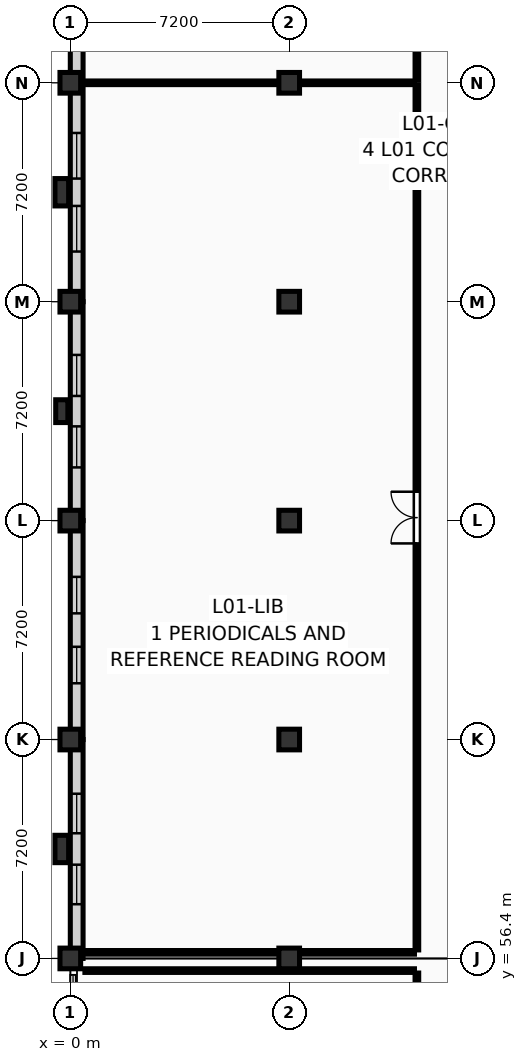
"""IFC4 building model, lengths in metres.
Left out: names, types, materials, properties, quantities, classifications, styles, units other than length and angle.
Written with IfcOpenShell. Run it as: python <this file> out.ifc"""

import sys

from ifc_helpers import new_model, si_unit, direction, frame, frame_2d, origin, origin_2d, place, context, subcontext, project, spatial, rectangle, extrude, element, fill, save


model = new_model("IFC4")
c1 = context("Model", 3, precision=1e-05, world=origin(), true_north=direction((0.0, 1.0)))
c2 = subcontext(c1, "Body", "Model", "MODEL_VIEW")
j1 = project(units=[si_unit("LENGTHUNIT", "METRE"), si_unit("PLANEANGLEUNIT", "RADIAN")], contexts=[c1])
p1 = place(None, origin())
s1 = spatial("IfcSite", under=j1, at=p1, CompositionType="ELEMENT")
p2 = place(p1, origin())
s2 = spatial("IfcBuilding", under=s1, at=p2, CompositionType="ELEMENT")
p3 = place(p2, frame((0.0, 0.0, 4.5)))
s3 = spatial("IfcBuildingStorey", under=s2, at=p3, CompositionType="ELEMENT", Elevation=4.5)
for number, where, z_axis, x_axis in (
    (1, (0.0, 56.4, 0.0), (0.0, 0.0, 1.0), (1.0, 0.0, 0.0)),
    (2, (0.0, 63.6, 0.0), (0.0, 0.0, 1.0), (1.0, 0.0, 0.0)),
    (3, (0.0, 70.8, 0.0), (0.0, 0.0, 1.0), (1.0, 0.0, 0.0)),
    (4, (0.0, 78.0, 0.0), (0.0, 0.0, 1.0), (1.0, 0.0, 0.0)),
    (5, (0.0, 85.2, 0.0), (0.0, 0.0, 1.0), (1.0, 0.0, 0.0)),
    (6, (7.2, 56.4, 0.0), (0.0, 0.0, 1.0), (1.0, 0.0, 0.0)),
    (7, (7.2, 63.6, 0.0), (0.0, 0.0, 1.0), (1.0, 0.0, 0.0)),
    (8, (7.2, 70.8, 0.0), (0.0, 0.0, 1.0), (1.0, 0.0, 0.0)),
    (9, (7.2, 78.0, 0.0), (0.0, 0.0, 1.0), (1.0, 0.0, 0.0)),
    (10, (7.2, 85.2, 0.0), (0.0, 0.0, 1.0), (1.0, 0.0, 0.0)),
):
    element("IfcColumn", number, at=place(p3, frame(where, z_axis=z_axis, x_axis=x_axis)), inside=s3, PredefinedType="COLUMN", context=c2, shape_type="SweptSolid", body=[
        extrude(rectangle(XDim=0.68, YDim=0.68, at=origin_2d()), origin(), (0.0, 0.0, 1.0), 4.05),
    ])
p4 = place(p3, frame((-0.28, 60.0, 0.0), z_axis=(0.0, 0.0, 1.0), x_axis=(1.0, 0.0, 0.0)))
e11 = element("IfcColumn", 11, at=p4, inside=s3, PredefinedType="PILASTER", context=c2, shape_type="SweptSolid", body=[
    extrude(rectangle(XDim=0.45, YDim=0.9, at=origin_2d()), origin(), (0.0, 0.0, 1.0), 4.05),
])
p5 = place(p3, frame((-0.28, 74.4, 0.0), z_axis=(0.0, 0.0, 1.0), x_axis=(1.0, 0.0, 0.0)))
e12 = element("IfcColumn", 12, at=p5, inside=s3, PredefinedType="PILASTER", context=c2, shape_type="SweptSolid", body=[
    extrude(rectangle(XDim=0.4, YDim=0.75, at=origin_2d()), origin(), (0.0, 0.0, 1.0), 4.05),
])
p6 = place(p3, frame((-0.28, 81.6, 0.0), z_axis=(0.0, 0.0, 1.0), x_axis=(1.0, 0.0, 0.0)))
e13 = element("IfcColumn", 13, at=p6, inside=s3, PredefinedType="PILASTER", context=c2, shape_type="SweptSolid", body=[
    extrude(rectangle(XDim=0.45, YDim=0.9, at=origin_2d()), origin(), (0.0, 0.0, 1.0), 4.05),
])
p7 = place(p3, frame((0.21, 56.4, 0.0), z_axis=(0.0, 0.0, 1.0), x_axis=(0.0, 1.0, 0.0)))
e14 = element("IfcWall", 14, at=p7, inside=s3, PredefinedType="SOLIDWALL", context=c2, shape_type="SweptSolid", body=[
    extrude(rectangle(XDim=7.2, YDim=0.42, at=frame_2d((3.6, 0.0))), origin(), (0.0, 0.0, 1.0), 3.16),
])
p8 = place(p7, frame((1.783, 0.0, 0.45)))
e15 = element("IfcOpeningElement", 15, at=p8, cuts=e14, PredefinedType="OPENING", context=c2, shape_type="SweptSolid", body=[
    extrude(rectangle(XDim=1.3, YDim=2.35, at=frame_2d((0.65, 1.175))), frame((0.0, 0.222, 0.0), z_axis=(0.0, -1.0, 0.0), x_axis=(1.0, 0.0, 0.0)), (0.0, 0.0, 1.0), 0.444),
])
p9 = place(p7, frame((4.117, 0.0, 0.45)))
e16 = element("IfcOpeningElement", 16, at=p9, cuts=e14, PredefinedType="OPENING", context=c2, shape_type="SweptSolid", body=[
    extrude(rectangle(XDim=1.3, YDim=2.35, at=frame_2d((0.65, 1.175))), frame((0.0, 0.222, 0.0), z_axis=(0.0, -1.0, 0.0), x_axis=(1.0, 0.0, 0.0)), (0.0, 0.0, 1.0), 0.444),
])
p10 = place(p3, frame((0.21, 63.6, 0.0), z_axis=(0.0, 0.0, 1.0), x_axis=(0.0, 1.0, 0.0)))
e17 = element("IfcWall", 17, at=p10, inside=s3, PredefinedType="SOLIDWALL", context=c2, shape_type="SweptSolid", body=[
    extrude(rectangle(XDim=7.2, YDim=0.42, at=frame_2d((3.6, 0.0))), origin(), (0.0, 0.0, 1.0), 3.16),
])
p11 = place(p10, frame((1.85, 0.0, 0.45)))
e18 = element("IfcOpeningElement", 18, at=p11, cuts=e17, PredefinedType="OPENING", context=c2, shape_type="SweptSolid", body=[
    extrude(rectangle(XDim=1.2, YDim=2.35, at=frame_2d((0.6, 1.175))), frame((0.0, 0.222, 0.0), z_axis=(0.0, -1.0, 0.0), x_axis=(1.0, 0.0, 0.0)), (0.0, 0.0, 1.0), 0.444),
])
p12 = place(p10, frame((4.15, 0.0, 0.45)))
e19 = element("IfcOpeningElement", 19, at=p12, cuts=e17, PredefinedType="OPENING", context=c2, shape_type="SweptSolid", body=[
    extrude(rectangle(XDim=1.2, YDim=2.35, at=frame_2d((0.6, 1.175))), frame((0.0, 0.222, 0.0), z_axis=(0.0, -1.0, 0.0), x_axis=(1.0, 0.0, 0.0)), (0.0, 0.0, 1.0), 0.444),
])
p13 = place(p3, frame((0.21, 70.8, 0.0), z_axis=(0.0, 0.0, 1.0), x_axis=(0.0, 1.0, 0.0)))
e20 = element("IfcWall", 20, at=p13, inside=s3, PredefinedType="SOLIDWALL", context=c2, shape_type="SweptSolid", body=[
    extrude(rectangle(XDim=7.2, YDim=0.42, at=frame_2d((3.6, 0.0))), origin(), (0.0, 0.0, 1.0), 3.16),
])
p14 = place(p13, frame((1.75, 0.0, 0.45)))
e21 = element("IfcOpeningElement", 21, at=p14, cuts=e20, PredefinedType="OPENING", context=c2, shape_type="SweptSolid", body=[
    extrude(rectangle(XDim=1.35, YDim=2.45, at=frame_2d((0.675, 1.225))), frame((0.0, 0.222, 0.0), z_axis=(0.0, -1.0, 0.0), x_axis=(1.0, 0.0, 0.0)), (0.0, 0.0, 1.0), 0.444),
])
p15 = place(p13, frame((4.1, 0.0, 0.45)))
e22 = element("IfcOpeningElement", 22, at=p15, cuts=e20, PredefinedType="OPENING", context=c2, shape_type="SweptSolid", body=[
    extrude(rectangle(XDim=1.35, YDim=2.45, at=frame_2d((0.675, 1.225))), frame((0.0, 0.222, 0.0), z_axis=(0.0, -1.0, 0.0), x_axis=(1.0, 0.0, 0.0)), (0.0, 0.0, 1.0), 0.444),
])
p16 = place(p3, frame((0.21, 78.0, 0.0), z_axis=(0.0, 0.0, 1.0), x_axis=(0.0, 1.0, 0.0)))
e23 = element("IfcWall", 23, at=p16, inside=s3, PredefinedType="SOLIDWALL", context=c2, shape_type="SweptSolid", body=[
    extrude(rectangle(XDim=7.2, YDim=0.42, at=frame_2d((3.6, 0.0))), origin(), (0.0, 0.0, 1.0), 3.16),
])
p17 = place(p16, frame((1.65, 0.0, 0.45)))
e24 = element("IfcOpeningElement", 24, at=p17, cuts=e23, PredefinedType="OPENING", context=c2, shape_type="SweptSolid", body=[
    extrude(rectangle(XDim=1.5, YDim=2.4, at=frame_2d((0.75, 1.2))), frame((0.0, 0.222, 0.0), z_axis=(0.0, -1.0, 0.0), x_axis=(1.0, 0.0, 0.0)), (0.0, 0.0, 1.0), 0.444),
])
p18 = place(p16, frame((4.05, 0.0, 0.45)))
e25 = element("IfcOpeningElement", 25, at=p18, cuts=e23, PredefinedType="OPENING", context=c2, shape_type="SweptSolid", body=[
    extrude(rectangle(XDim=1.5, YDim=2.4, at=frame_2d((0.75, 1.2))), frame((0.0, 0.222, 0.0), z_axis=(0.0, -1.0, 0.0), x_axis=(1.0, 0.0, 0.0)), (0.0, 0.0, 1.0), 0.444),
])
p19 = place(p3, frame((0.21, 85.2, 0.0), z_axis=(0.0, 0.0, 1.0), x_axis=(0.0, 1.0, 0.0)))
e26 = element("IfcWall", 26, at=p19, inside=s3, PredefinedType="SOLIDWALL", context=c2, shape_type="SweptSolid", body=[
    extrude(rectangle(XDim=7.2, YDim=0.42, at=frame_2d((3.6, 0.0))), origin(), (0.0, 0.0, 1.0), 3.16),
])
p20 = place(p19, frame((1.717, 0.0, 0.45)))
e27 = element("IfcOpeningElement", 27, at=p20, cuts=e26, PredefinedType="OPENING", context=c2, shape_type="SweptSolid", body=[
    extrude(rectangle(XDim=1.4, YDim=2.38, at=frame_2d((0.7, 1.19))), frame((0.0, 0.222, 0.0), z_axis=(0.0, -1.0, 0.0), x_axis=(1.0, 0.0, 0.0)), (0.0, 0.0, 1.0), 0.444),
])
p21 = place(p19, frame((4.083, 0.0, 0.45)))
e28 = element("IfcOpeningElement", 28, at=p21, cuts=e26, PredefinedType="OPENING", context=c2, shape_type="SweptSolid", body=[
    extrude(rectangle(XDim=1.4, YDim=2.38, at=frame_2d((0.7, 1.19))), frame((0.0, 0.222, 0.0), z_axis=(0.0, -1.0, 0.0), x_axis=(1.0, 0.0, 0.0)), (0.0, 0.0, 1.0), 0.444),
])
p22 = place(p3, frame((11.4, 38.48, 0.0), z_axis=(0.0, 0.0, 1.0), x_axis=(0.0, 1.0, 0.0)))
e29 = element("IfcWall", 29, at=p22, inside=s3, PredefinedType="PARTITIONING", context=c2, shape_type="SweptSolid", body=[
    extrude(rectangle(XDim=17.44, YDim=0.12, at=frame_2d((8.72, 0.0))), origin(), (0.0, 0.0, 1.0), 3.775),
])
p23 = place(p22, frame((8.06, 0.0, 0.0)))
e30 = element("IfcOpeningElement", 30, at=p23, cuts=e29, PredefinedType="OPENING", context=c2, shape_type="SweptSolid", body=[
    extrude(rectangle(XDim=1.32, YDim=2.2, at=frame_2d((0.66, 1.1))), frame((0.0, 0.072, 0.0), z_axis=(0.0, -1.0, 0.0), x_axis=(1.0, 0.0, 0.0)), (0.0, 0.0, 1.0), 0.144),
])
for number, where, z_axis, x_axis in (
    (31, (0.48, 56.0, 0.0), (0.0, 0.0, 1.0), (1.0, 0.0, 0.0)),
    (32, (0.48, 56.6, 0.0), (0.0, 0.0, 1.0), (1.0, 0.0, 0.0)),
):
    element("IfcWall", number, at=place(p3, frame(where, z_axis=z_axis, x_axis=x_axis)), inside=s3, PredefinedType="PARTITIONING", context=c2, shape_type="SweptSolid", body=[
        extrude(rectangle(XDim=10.84, YDim=0.12, at=frame_2d((5.42, 0.0))), origin(), (0.0, 0.0, 1.0), 3.025),
    ])
p24 = place(p3, frame((11.4, 56.68, 0.0), z_axis=(0.0, 0.0, 1.0), x_axis=(0.0, 1.0, 0.0)))
e33 = element("IfcWall", 33, at=p24, inside=s3, PredefinedType="PARTITIONING", context=c2, shape_type="SweptSolid", body=[
    extrude(rectangle(XDim=28.44, YDim=0.12, at=frame_2d((14.22, 0.0))), origin(), (0.0, 0.0, 1.0), 3.775),
])
p25 = place(p24, frame((13.37, 0.0, 0.0)))
e34 = element("IfcOpeningElement", 34, at=p25, cuts=e33, PredefinedType="OPENING", context=c2, shape_type="SweptSolid", body=[
    extrude(rectangle(XDim=1.7, YDim=2.28, at=frame_2d((0.85, 1.14))), frame((0.0, 0.072, 0.0), z_axis=(0.0, -1.0, 0.0), x_axis=(1.0, 0.0, 0.0)), (0.0, 0.0, 1.0), 0.144),
])
p26 = place(p3, frame((0.48, 85.2, 0.0), z_axis=(0.0, 0.0, 1.0), x_axis=(1.0, 0.0, 0.0)))
e35 = element("IfcWall", 35, at=p26, inside=s3, PredefinedType="PARTITIONING", context=c2, shape_type="SweptSolid", body=[
    extrude(rectangle(XDim=10.84, YDim=0.12, at=frame_2d((5.42, 0.0))), origin(), (0.0, 0.0, 1.0), 3.025),
])
p27 = place(p3, frame((11.4, 85.28, 0.0), z_axis=(0.0, 0.0, 1.0), x_axis=(0.0, 1.0, 0.0)))
e36 = element("IfcWall", 36, at=p27, inside=s3, PredefinedType="PARTITIONING", context=c2, shape_type="SweptSolid", body=[
    extrude(rectangle(XDim=25.84, YDim=0.12, at=frame_2d((12.92, 0.0))), origin(), (0.0, 0.0, 1.0), 3.775),
])
p28 = place(p27, frame((11.94, 0.0, 0.0)))
e37 = element("IfcOpeningElement", 37, at=p28, cuts=e36, PredefinedType="OPENING", context=c2, shape_type="SweptSolid", body=[
    extrude(rectangle(XDim=1.7, YDim=2.28, at=frame_2d((0.85, 1.14))), frame((0.0, 0.072, 0.0), z_axis=(0.0, -1.0, 0.0), x_axis=(1.0, 0.0, 0.0)), (0.0, 0.0, 1.0), 0.144),
])
p29 = place(p8, origin())
e38 = element("IfcWindow", 38, at=p29, inside=s3, PartitioningType="SINGLE_PANEL", PredefinedType="WINDOW", context=c2, shape_type="SweptSolid", body=[
    extrude(rectangle(XDim=1.3, YDim=2.35, at=frame_2d((0.65, 1.175))), frame((0.0, 0.03, 0.0), z_axis=(0.0, -1.0, 0.0), x_axis=(1.0, 0.0, 0.0)), (0.0, 0.0, 1.0), 0.06),
])
fill(e15, e38)
p30 = place(p9, origin())
e39 = element("IfcWindow", 39, at=p30, inside=s3, PartitioningType="SINGLE_PANEL", PredefinedType="WINDOW", context=c2, shape_type="SweptSolid", body=[
    extrude(rectangle(XDim=1.3, YDim=2.35, at=frame_2d((0.65, 1.175))), frame((0.0, 0.03, 0.0), z_axis=(0.0, -1.0, 0.0), x_axis=(1.0, 0.0, 0.0)), (0.0, 0.0, 1.0), 0.06),
])
fill(e16, e39)
p31 = place(p11, origin())
e40 = element("IfcWindow", 40, at=p31, inside=s3, PartitioningType="SINGLE_PANEL", PredefinedType="WINDOW", context=c2, shape_type="SweptSolid", body=[
    extrude(rectangle(XDim=1.2, YDim=2.35, at=frame_2d((0.6, 1.175))), frame((0.0, 0.03, 0.0), z_axis=(0.0, -1.0, 0.0), x_axis=(1.0, 0.0, 0.0)), (0.0, 0.0, 1.0), 0.06),
])
fill(e18, e40)
p32 = place(p12, origin())
e41 = element("IfcWindow", 41, at=p32, inside=s3, PartitioningType="SINGLE_PANEL", PredefinedType="WINDOW", context=c2, shape_type="SweptSolid", body=[
    extrude(rectangle(XDim=1.2, YDim=2.35, at=frame_2d((0.6, 1.175))), frame((0.0, 0.03, 0.0), z_axis=(0.0, -1.0, 0.0), x_axis=(1.0, 0.0, 0.0)), (0.0, 0.0, 1.0), 0.06),
])
fill(e19, e41)
p33 = place(p14, origin())
e42 = element("IfcWindow", 42, at=p33, inside=s3, PartitioningType="SINGLE_PANEL", PredefinedType="WINDOW", context=c2, shape_type="SweptSolid", body=[
    extrude(rectangle(XDim=1.35, YDim=2.45, at=frame_2d((0.675, 1.225))), frame((0.0, 0.03, 0.0), z_axis=(0.0, -1.0, 0.0), x_axis=(1.0, 0.0, 0.0)), (0.0, 0.0, 1.0), 0.06),
])
fill(e21, e42)
p34 = place(p15, origin())
e43 = element("IfcWindow", 43, at=p34, inside=s3, PartitioningType="SINGLE_PANEL", PredefinedType="WINDOW", context=c2, shape_type="SweptSolid", body=[
    extrude(rectangle(XDim=1.35, YDim=2.45, at=frame_2d((0.675, 1.225))), frame((0.0, 0.03, 0.0), z_axis=(0.0, -1.0, 0.0), x_axis=(1.0, 0.0, 0.0)), (0.0, 0.0, 1.0), 0.06),
])
fill(e22, e43)
p35 = place(p17, origin())
e44 = element("IfcWindow", 44, at=p35, inside=s3, PartitioningType="SINGLE_PANEL", PredefinedType="WINDOW", context=c2, shape_type="SweptSolid", body=[
    extrude(rectangle(XDim=1.5, YDim=2.4, at=frame_2d((0.75, 1.2))), frame((0.0, 0.03, 0.0), z_axis=(0.0, -1.0, 0.0), x_axis=(1.0, 0.0, 0.0)), (0.0, 0.0, 1.0), 0.06),
])
fill(e24, e44)
p36 = place(p18, origin())
e45 = element("IfcWindow", 45, at=p36, inside=s3, PartitioningType="SINGLE_PANEL", PredefinedType="WINDOW", context=c2, shape_type="SweptSolid", body=[
    extrude(rectangle(XDim=1.5, YDim=2.4, at=frame_2d((0.75, 1.2))), frame((0.0, 0.03, 0.0), z_axis=(0.0, -1.0, 0.0), x_axis=(1.0, 0.0, 0.0)), (0.0, 0.0, 1.0), 0.06),
])
fill(e25, e45)
p37 = place(p25, origin())
e46 = element("IfcDoor", 46, at=p37, inside=s3, OperationType="DOUBLE_DOOR_SINGLE_SWING", PredefinedType="DOOR", context=c2, shape_type="SweptSolid", body=[
    extrude(rectangle(XDim=1.7, YDim=2.28, at=frame_2d((0.85, 1.14))), frame((0.0, 0.025, 0.0), z_axis=(0.0, -1.0, 0.0), x_axis=(1.0, 0.0, 0.0)), (0.0, 0.0, 1.0), 0.05),
])
fill(e34, e46)
save(model, sys.argv[1])
